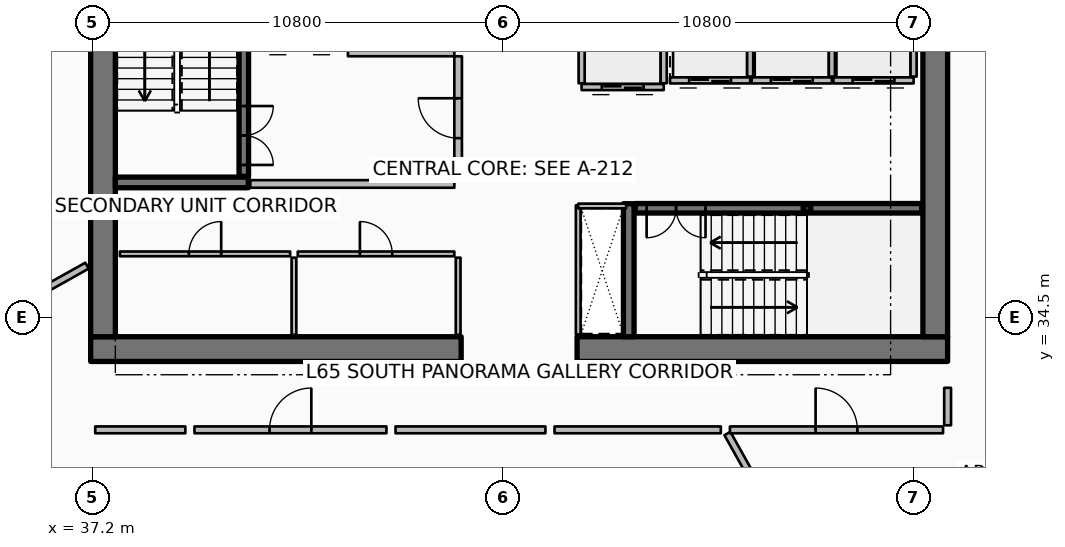
"""IFC4 building model, lengths in metres.
Left out: names, types, materials, properties, quantities, classifications, styles, units other than length and angle.
Written with IfcOpenShell. Run it as: python <this file> out.ifc"""

import sys

from ifc_helpers import new_model, si_unit, direction, frame, frame_2d, origin, origin_2d, place, context, subcontext, project, spatial, rectangle, hollow_rectangle, extrude, element, fill, save


model = new_model("IFC4")
c1 = context("Model", 3, precision=1e-05, world=origin(), true_north=direction((0.0, 1.0)))
c2 = subcontext(c1, "Body", "Model", "MODEL_VIEW")
j1 = project(units=[si_unit("LENGTHUNIT", "METRE"), si_unit("PLANEANGLEUNIT", "RADIAN")], contexts=[c1])
p1 = place(None, origin())
s1 = spatial("IfcSite", under=j1, at=p1, CompositionType="ELEMENT")
p2 = place(p1, origin())
s2 = spatial("IfcBuilding", under=s1, at=p2, CompositionType="ELEMENT")
p3 = place(p2, frame((0.0, 0.0, 259.8)))
s3 = spatial("IfcBuildingStorey", under=s2, at=p3, CompositionType="ELEMENT", Elevation=259.8)
for number, where, z_axis, x_axis in (
    (1, (37.15, 33.675, 0.0), (0.0, 0.0, 1.0), (1.0, 0.0, 0.0)),
    (2, (49.95, 33.675, 0.0), (0.0, 0.0, 1.0), (1.0, 0.0, 0.0)),
):
    element("IfcWall", number, at=place(p3, frame(where, z_axis=z_axis, x_axis=x_axis)), inside=s3, PredefinedType="SHEAR", context=c2, shape_type="SweptSolid", body=[
        extrude(rectangle(XDim=9.75, YDim=0.65, at=frame_2d((4.875, 0.0))), origin(), (0.0, 0.0, 1.0), 3.85),
    ])
for number, where, z_axis, x_axis in (
    (3, (37.475, 34.0, 0.0), (0.0, 0.0, 1.0), (0.0, 1.0, 0.0)),
    (4, (59.375, 34.0, 0.0), (0.0, 0.0, 1.0), (0.0, 1.0, 0.0)),
):
    element("IfcWall", number, at=place(p3, frame(where, z_axis=z_axis, x_axis=x_axis)), inside=s3, PredefinedType="SHEAR", context=c2, shape_type="SweptSolid", body=[
        extrude(rectangle(XDim=16.0, YDim=0.65, at=frame_2d((8.0, 0.0))), origin(), (0.0, 0.0, 1.0), 3.85),
    ])
for number, where, z_axis, x_axis in (
    (5, (37.8, 38.06, 0.0), (0.0, 0.0, 1.0), (1.0, 0.0, 0.0)),
    (6, (51.31, 34.0, 0.0), (0.0, 0.0, 1.0), (0.0, 1.0, 0.0)),
):
    element("IfcWall", number, at=place(p3, frame(where, z_axis=z_axis, x_axis=x_axis)), inside=s3, PredefinedType="SHEAR", context=c2, shape_type="SweptSolid", body=[
        extrude(rectangle(XDim=3.5, YDim=0.28, at=frame_2d((1.75, 0.0))), origin(), (0.0, 0.0, 1.0), 3.85),
    ])
p4 = place(p3, frame((56.0, 37.38, 0.0), z_axis=(0.0, 0.0, 1.0), x_axis=(1.0, 0.0, 0.0)))
e7 = element("IfcColumn", 7, at=p4, inside=s3, PredefinedType="COLUMN", context=c2, shape_type="SweptSolid", body=[
    extrude(hollow_rectangle(XDim=0.2, YDim=0.2, WallThickness=0.01, InnerFilletRadius=0.01, OuterFilletRadius=0.02, at=origin_2d()), origin(), (0.0, 0.0, 1.0), 1.72),
])
p5 = place(p3, frame((41.18, 38.22, 0.0), z_axis=(0.0, 0.0, 1.0), x_axis=(0.0, 1.0, 0.0)))
e8 = element("IfcWall", 8, at=p5, inside=s3, PredefinedType="SOLIDWALL", context=c2, shape_type="SweptSolid", body=[
    extrude(rectangle(XDim=7.56, YDim=0.25, at=frame_2d((3.78, 0.0))), origin(), (0.0, 0.0, 1.0), 3.59),
])
p6 = place(p5, frame((0.3, 0.0, 0.0)))
e9 = element("IfcOpeningElement", 9, at=p6, cuts=e8, PredefinedType="OPENING", context=c2, shape_type="SweptSolid", body=[
    extrude(rectangle(XDim=1.55, YDim=2.15, at=frame_2d((0.775, 1.075))), frame((0.0, 0.135, 0.0), z_axis=(0.0, -1.0, 0.0), x_axis=(1.0, 0.0, 0.0)), (0.0, 0.0, 1.0), 0.27),
])
p7 = place(p3, frame((51.48, 37.38, 0.0), z_axis=(0.0, 0.0, 1.0), x_axis=(1.0, 0.0, 0.0)))
e10 = element("IfcWall", 10, at=p7, inside=s3, PredefinedType="SOLIDWALL", context=c2, shape_type="SweptSolid", body=[
    extrude(rectangle(XDim=7.54, YDim=0.25, at=frame_2d((3.77, 0.0))), origin(), (0.0, 0.0, 1.0), 3.59),
])
p8 = place(p7, frame((0.3, 0.0, 0.0)))
e11 = element("IfcOpeningElement", 11, at=p8, cuts=e10, PredefinedType="OPENING", context=c2, shape_type="SweptSolid", body=[
    extrude(rectangle(XDim=1.55, YDim=2.15, at=frame_2d((0.775, 1.075))), frame((0.0, 0.135, 0.0), z_axis=(0.0, -1.0, 0.0), x_axis=(1.0, 0.0, 0.0)), (0.0, 0.0, 1.0), 0.27),
])
p9 = place(p3, frame((54.505, 40.745, 0.0), z_axis=(0.0, 0.0, 1.0), x_axis=(-1.0, 0.0, 0.0)))
e12 = element("IfcWall", 12, at=p9, inside=s3, PredefinedType="PARTITIONING", context=c2, shape_type="SweptSolid", body=[
    extrude(rectangle(XDim=2.11, YDim=0.16, at=frame_2d((1.055, 0.0))), origin(), (0.0, 0.0, 1.0), 3.59),
])
p10 = place(p9, frame((0.505, 0.0, 0.0)))
e13 = element("IfcOpeningElement", 13, at=p10, cuts=e12, PredefinedType="OPENING", context=c2, shape_type="SweptSolid", body=[
    extrude(rectangle(XDim=1.1, YDim=2.1, at=frame_2d((0.55, 1.05))), frame((0.0, 0.09, 0.0), z_axis=(0.0, -1.0, 0.0), x_axis=(1.0, 0.0, 0.0)), (0.0, 0.0, 1.0), 0.18),
])
p11 = place(p3, frame((54.505, 40.845, 0.0), z_axis=(0.0, 0.0, 1.0), x_axis=(0.0, 1.0, 0.0)))
e14 = element("IfcWall", 14, at=p11, inside=s3, PredefinedType="PARTITIONING", context=c2, shape_type="SweptSolid", body=[
    extrude(rectangle(XDim=1.61, YDim=0.16, at=frame_2d((0.805, 0.0))), origin(), (0.0, 0.0, 1.0), 3.59),
])
p12 = place(p3, frame((56.655, 40.745, 0.0), z_axis=(0.0, 0.0, 1.0), x_axis=(-1.0, 0.0, 0.0)))
e15 = element("IfcWall", 15, at=p12, inside=s3, PredefinedType="PARTITIONING", context=c2, shape_type="SweptSolid", body=[
    extrude(rectangle(XDim=2.11, YDim=0.16, at=frame_2d((1.055, 0.0))), origin(), (0.0, 0.0, 1.0), 3.59),
])
p13 = place(p12, frame((0.505, 0.0, 0.0)))
e16 = element("IfcOpeningElement", 16, at=p13, cuts=e15, PredefinedType="OPENING", context=c2, shape_type="SweptSolid", body=[
    extrude(rectangle(XDim=1.1, YDim=2.1, at=frame_2d((0.55, 1.05))), frame((0.0, 0.09, 0.0), z_axis=(0.0, -1.0, 0.0), x_axis=(1.0, 0.0, 0.0)), (0.0, 0.0, 1.0), 0.18),
])
p14 = place(p3, frame((56.655, 40.845, 0.0), z_axis=(0.0, 0.0, 1.0), x_axis=(0.0, 1.0, 0.0)))
e17 = element("IfcWall", 17, at=p14, inside=s3, PredefinedType="PARTITIONING", context=c2, shape_type="SweptSolid", body=[
    extrude(rectangle(XDim=1.61, YDim=0.16, at=frame_2d((0.805, 0.0))), origin(), (0.0, 0.0, 1.0), 3.59),
])
p15 = place(p3, frame((58.805, 40.745, 0.0), z_axis=(0.0, 0.0, 1.0), x_axis=(-1.0, 0.0, 0.0)))
e18 = element("IfcWall", 18, at=p15, inside=s3, PredefinedType="PARTITIONING", context=c2, shape_type="SweptSolid", body=[
    extrude(rectangle(XDim=2.11, YDim=0.16, at=frame_2d((1.055, 0.0))), origin(), (0.0, 0.0, 1.0), 3.59),
])
p16 = place(p15, frame((0.505, 0.0, 0.0)))
e19 = element("IfcOpeningElement", 19, at=p16, cuts=e18, PredefinedType="OPENING", context=c2, shape_type="SweptSolid", body=[
    extrude(rectangle(XDim=1.1, YDim=2.1, at=frame_2d((0.55, 1.05))), frame((0.0, 0.09, 0.0), z_axis=(0.0, -1.0, 0.0), x_axis=(1.0, 0.0, 0.0)), (0.0, 0.0, 1.0), 0.18),
])
p17 = place(p3, frame((58.805, 40.845, 0.0), z_axis=(0.0, 0.0, 1.0), x_axis=(0.0, 1.0, 0.0)))
e20 = element("IfcWall", 20, at=p17, inside=s3, PredefinedType="PARTITIONING", context=c2, shape_type="SweptSolid", body=[
    extrude(rectangle(XDim=1.61, YDim=0.16, at=frame_2d((0.805, 0.0))), origin(), (0.0, 0.0, 1.0), 3.59),
])
p18 = place(p3, frame((52.23, 40.57, 0.0), z_axis=(0.0, 0.0, 1.0), x_axis=(-1.0, 0.0, 0.0)))
e21 = element("IfcWall", 21, at=p18, inside=s3, PredefinedType="PARTITIONING", context=c2, shape_type="SweptSolid", body=[
    extrude(rectangle(XDim=2.16, YDim=0.16, at=frame_2d((1.08, 0.0))), origin(), (0.0, 0.0, 1.0), 3.59),
])
p19 = place(p18, frame((0.53, 0.0, 0.0)))
e22 = element("IfcOpeningElement", 22, at=p19, cuts=e21, PredefinedType="OPENING", context=c2, shape_type="SweptSolid", body=[
    extrude(rectangle(XDim=1.1, YDim=2.1, at=frame_2d((0.55, 1.05))), frame((0.0, 0.09, 0.0), z_axis=(0.0, -1.0, 0.0), x_axis=(1.0, 0.0, 0.0)), (0.0, 0.0, 1.0), 0.18),
])
for number, where, z_axis, x_axis in (
    (23, (52.23, 40.67, 0.0), (0.0, 0.0, 1.0), (0.0, 1.0, 0.0)),
    (24, (50.07, 40.67, 0.0), (0.0, 0.0, 1.0), (0.0, 1.0, 0.0)),
):
    element("IfcWall", number, at=place(p3, frame(where, z_axis=z_axis, x_axis=x_axis)), inside=s3, PredefinedType="PARTITIONING", context=c2, shape_type="SweptSolid", body=[
        extrude(rectangle(XDim=2.16, YDim=0.16, at=frame_2d((1.08, 0.0))), origin(), (0.0, 0.0, 1.0), 3.59),
    ])
for number, where, z_axis, x_axis in (
    (25, (46.82, 34.05, 0.0), (0.0, 0.0, 1.0), (0.0, 1.0, 0.0)),
    (26, (42.5, 34.05, 0.0), (0.0, 0.0, 1.0), (0.0, 1.0, 0.0)),
):
    element("IfcWall", number, at=place(p3, frame(where, z_axis=z_axis, x_axis=x_axis)), inside=s3, PredefinedType="PARTITIONING", context=c2, shape_type="SweptSolid", body=[
        extrude(rectangle(XDim=2.03, YDim=0.125, at=frame_2d((1.015, 0.0))), origin(), (0.0, 0.0, 1.0), 3.03),
    ])
p20 = place(p3, frame((37.92, 36.18, 0.0), z_axis=(0.0, 0.0, 1.0), x_axis=(1.0, 0.0, 0.0)))
e27 = element("IfcWall", 27, at=p20, inside=s3, PredefinedType="PARTITIONING", context=c2, shape_type="SweptSolid", body=[
    extrude(rectangle(XDim=4.48, YDim=0.125, at=frame_2d((2.24, 0.0))), origin(), (0.0, 0.0, 1.0), 3.03),
])
p21 = place(p20, frame((1.815, 0.0, 0.0)))
e28 = element("IfcOpeningElement", 28, at=p21, cuts=e27, PredefinedType="OPENING", context=c2, shape_type="SweptSolid", body=[
    extrude(rectangle(XDim=0.85, YDim=2.06, at=frame_2d((0.425, 1.03))), frame((0.0, 0.073, 0.0), z_axis=(0.0, -1.0, 0.0), x_axis=(1.0, 0.0, 0.0)), (0.0, 0.0, 1.0), 0.145),
])
p22 = place(p3, frame((42.6, 36.18, 0.0), z_axis=(0.0, 0.0, 1.0), x_axis=(1.0, 0.0, 0.0)))
e29 = element("IfcWall", 29, at=p22, inside=s3, PredefinedType="PARTITIONING", context=c2, shape_type="SweptSolid", body=[
    extrude(rectangle(XDim=4.12, YDim=0.125, at=frame_2d((2.06, 0.0))), origin(), (0.0, 0.0, 1.0), 3.03),
])
p23 = place(p22, frame((1.635, 0.0, 0.0)))
e30 = element("IfcOpeningElement", 30, at=p23, cuts=e29, PredefinedType="OPENING", context=c2, shape_type="SweptSolid", body=[
    extrude(rectangle(XDim=0.85, YDim=2.06, at=frame_2d((0.425, 1.03))), frame((0.0, 0.073, 0.0), z_axis=(0.0, -1.0, 0.0), x_axis=(1.0, 0.0, 0.0)), (0.0, 0.0, 1.0), 0.145),
])
p24 = place(p3, frame((41.35, 38.02, 0.0), z_axis=(0.0, 0.0, 1.0), x_axis=(1.0, 0.0, 0.0)))
e31 = element("IfcWall", 31, at=p24, inside=s3, PredefinedType="PARTITIONING", context=c2, shape_type="SweptSolid", body=[
    extrude(rectangle(XDim=5.37, YDim=0.2, at=frame_2d((2.685, 0.0))), origin(), (0.0, 0.0, 1.0), 3.59),
])
p25 = place(p3, frame((43.92, 41.48, 0.0), z_axis=(0.0, 0.0, 1.0), x_axis=(1.0, 0.0, 0.0)))
e32 = element("IfcWall", 32, at=p25, inside=s3, PredefinedType="PARTITIONING", context=c2, shape_type="SweptSolid", body=[
    extrude(rectangle(XDim=2.8, YDim=0.2, at=frame_2d((1.4, 0.0))), origin(), (0.0, 0.0, 1.0), 3.59),
])
p26 = place(p3, frame((46.82, 38.12, 0.0), z_axis=(0.0, 0.0, 1.0), x_axis=(0.0, 1.0, 0.0)))
e33 = element("IfcWall", 33, at=p26, inside=s3, PredefinedType="PARTITIONING", context=c2, shape_type="SweptSolid", body=[
    extrude(rectangle(XDim=3.26, YDim=0.2, at=frame_2d((1.63, 0.0))), origin(), (0.0, 0.0, 1.0), 3.59),
])
p27 = place(p26, frame((1.105, 0.0, 0.0)))
e34 = element("IfcOpeningElement", 34, at=p27, cuts=e33, PredefinedType="OPENING", context=c2, shape_type="SweptSolid", body=[
    extrude(rectangle(XDim=1.05, YDim=2.1, at=frame_2d((0.525, 1.05))), frame((0.0, 0.11, 0.0), z_axis=(0.0, -1.0, 0.0), x_axis=(1.0, 0.0, 0.0)), (0.0, 0.0, 1.0), 0.22),
])
p28 = place(p3, frame((49.98, 34.06, 0.0), z_axis=(0.0, 0.0, 1.0), x_axis=(0.0, 1.0, 0.0)))
e35 = element("IfcWall", 35, at=p28, inside=s3, PredefinedType="PARTITIONING", context=c2, shape_type="SweptSolid", body=[
    extrude(rectangle(XDim=3.4, YDim=0.125, at=frame_2d((1.7, 0.0))), origin(), (0.0, 0.0, 1.0), 3.03),
])
p29 = place(p3, frame((49.98, 37.44, 0.0), z_axis=(0.0, 0.0, 1.0), x_axis=(1.0, 0.0, 0.0)))
e36 = element("IfcWall", 36, at=p29, inside=s3, PredefinedType="PARTITIONING", context=c2, shape_type="SweptSolid", body=[
    extrude(rectangle(XDim=1.26, YDim=0.125, at=frame_2d((0.63, 0.0))), origin(), (0.0, 0.0, 1.0), 3.03),
])
p30 = place(p3, frame((37.054, 35.87, 0.0), z_axis=(0.0, 0.0, 1.0), x_axis=(-0.872490186067, -0.488631635506, 0.0)))
e37 = element("IfcWall", 37, at=p30, inside=s3, PredefinedType="PARTITIONING", context=c2, shape_type="SweptSolid", body=[
    extrude(rectangle(XDim=17.884, YDim=0.18, at=frame_2d((8.942, 0.0))), origin(), (0.0, 0.0, 1.0), 2.957),
])
p31 = place(p3, frame((53.906, 31.454, 0.0), z_axis=(0.0, 0.0, 1.0), x_axis=(0.48862654941, -0.872493034477, 0.0)))
e38 = element("IfcWall", 38, at=p31, inside=s3, PredefinedType="PARTITIONING", context=c2, shape_type="SweptSolid", body=[
    extrude(rectangle(XDim=12.508, YDim=0.18, at=frame_2d((6.254, 0.0))), origin(), (0.0, 0.0, 1.0), 2.957),
])
p32 = place(p3, frame((39.882, 31.55, 0.0), z_axis=(0.0, 0.0, 1.0), x_axis=(1.0, 0.0, 0.0)))
e39 = element("IfcWall", 39, at=p32, inside=s3, PredefinedType="PARTITIONING", context=c2, shape_type="SweptSolid", body=[
    extrude(rectangle(XDim=5.051, YDim=0.18, at=frame_2d((2.525, 0.0))), origin(), (0.0, 0.0, 1.0), 2.957),
])
p33 = place(p32, frame((1.975, 0.0, 0.0)))
e40 = element("IfcOpeningElement", 40, at=p33, cuts=e39, PredefinedType="OPENING", context=c2, shape_type="SweptSolid", body=[
    extrude(rectangle(XDim=1.1, YDim=2.1, at=frame_2d((0.55, 1.05))), frame((0.0, 0.1, 0.0), z_axis=(0.0, -1.0, 0.0), x_axis=(1.0, 0.0, 0.0)), (0.0, 0.0, 1.0), 0.2),
])
p34 = place(p3, frame((37.27, 31.55, 0.0), z_axis=(0.0, 0.0, 1.0), x_axis=(1.0, 0.0, 0.0)))
e41 = element("IfcWall", 41, at=p34, inside=s3, PredefinedType="PARTITIONING", context=c2, shape_type="SweptSolid", body=[
    extrude(rectangle(XDim=2.372, YDim=0.18, at=frame_2d((1.186, 0.0))), origin(), (0.0, 0.0, 1.0), 2.957),
])
p35 = place(p3, frame((45.173, 31.55, 0.0), z_axis=(0.0, 0.0, 1.0), x_axis=(1.0, 0.0, 0.0)))
e42 = element("IfcWall", 42, at=p35, inside=s3, PredefinedType="PARTITIONING", context=c2, shape_type="SweptSolid", body=[
    extrude(rectangle(XDim=3.944, YDim=0.18, at=frame_2d((1.972, 0.0))), origin(), (0.0, 0.0, 1.0), 2.957),
])
p36 = place(p3, frame((49.357, 31.55, 0.0), z_axis=(0.0, 0.0, 1.0), x_axis=(1.0, 0.0, 0.0)))
e43 = element("IfcWall", 43, at=p36, inside=s3, PredefinedType="PARTITIONING", context=c2, shape_type="SweptSolid", body=[
    extrude(rectangle(XDim=4.376, YDim=0.18, at=frame_2d((2.188, 0.0))), origin(), (0.0, 0.0, 1.0), 2.957),
])
p37 = place(p3, frame((53.972, 31.55, 0.0), z_axis=(0.0, 0.0, 1.0), x_axis=(1.0, 0.0, 0.0)))
e44 = element("IfcWall", 44, at=p37, inside=s3, PredefinedType="PARTITIONING", context=c2, shape_type="SweptSolid", body=[
    extrude(rectangle(XDim=5.608, YDim=0.18, at=frame_2d((2.804, 0.0))), origin(), (0.0, 0.0, 1.0), 2.957),
])
p38 = place(p37, frame((2.254, 0.0, 0.0)))
e45 = element("IfcOpeningElement", 45, at=p38, cuts=e44, PredefinedType="OPENING", context=c2, shape_type="SweptSolid", body=[
    extrude(rectangle(XDim=1.1, YDim=2.1, at=frame_2d((0.55, 1.05))), frame((0.0, 0.1, 0.0), z_axis=(0.0, -1.0, 0.0), x_axis=(1.0, 0.0, 0.0)), (0.0, 0.0, 1.0), 0.2),
])
p39 = place(p3, frame((59.7, 31.67, 0.0), z_axis=(0.0, 0.0, 1.0), x_axis=(0.0, 1.0, 0.0)))
e46 = element("IfcWall", 46, at=p39, inside=s3, PredefinedType="PARTITIONING", context=c2, shape_type="SweptSolid", body=[
    extrude(rectangle(XDim=0.987, YDim=0.18, at=frame_2d((0.493, 0.0))), origin(), (0.0, 0.0, 1.0), 2.957),
])
p40 = place(p6, origin())
e47 = element("IfcDoor", 47, at=p40, inside=s3, OperationType="DOUBLE_DOOR_SINGLE_SWING", PredefinedType="DOOR", context=c2, shape_type="SweptSolid", body=[
    extrude(rectangle(XDim=1.55, YDim=2.15, at=frame_2d((0.775, 1.075))), frame((0.0, 0.025, 0.0), z_axis=(0.0, -1.0, 0.0), x_axis=(1.0, 0.0, 0.0)), (0.0, 0.0, 1.0), 0.05),
])
fill(e9, e47)
p41 = place(p8, origin())
e48 = element("IfcDoor", 48, at=p41, inside=s3, OperationType="DOUBLE_DOOR_SINGLE_SWING", PredefinedType="DOOR", context=c2, shape_type="SweptSolid", body=[
    extrude(rectangle(XDim=1.55, YDim=2.15, at=frame_2d((0.775, 1.075))), frame((0.0, 0.025, 0.0), z_axis=(0.0, -1.0, 0.0), x_axis=(1.0, 0.0, 0.0)), (0.0, 0.0, 1.0), 0.05),
])
fill(e11, e48)
p42 = place(p10, origin())
e49 = element("IfcDoor", 49, at=p42, inside=s3, OperationType="DOUBLE_DOOR_SLIDING", PredefinedType="DOOR", context=c2, shape_type="SweptSolid", body=[
    extrude(rectangle(XDim=1.1, YDim=2.1, at=frame_2d((0.55, 1.05))), frame((0.0, 0.025, 0.0), z_axis=(0.0, -1.0, 0.0), x_axis=(1.0, 0.0, 0.0)), (0.0, 0.0, 1.0), 0.05),
])
fill(e13, e49)
p43 = place(p13, origin())
e50 = element("IfcDoor", 50, at=p43, inside=s3, OperationType="DOUBLE_DOOR_SLIDING", PredefinedType="DOOR", context=c2, shape_type="SweptSolid", body=[
    extrude(rectangle(XDim=1.1, YDim=2.1, at=frame_2d((0.55, 1.05))), frame((0.0, 0.025, 0.0), z_axis=(0.0, -1.0, 0.0), x_axis=(1.0, 0.0, 0.0)), (0.0, 0.0, 1.0), 0.05),
])
fill(e16, e50)
p44 = place(p16, origin())
e51 = element("IfcDoor", 51, at=p44, inside=s3, OperationType="DOUBLE_DOOR_SLIDING", PredefinedType="DOOR", context=c2, shape_type="SweptSolid", body=[
    extrude(rectangle(XDim=1.1, YDim=2.1, at=frame_2d((0.55, 1.05))), frame((0.0, 0.025, 0.0), z_axis=(0.0, -1.0, 0.0), x_axis=(1.0, 0.0, 0.0)), (0.0, 0.0, 1.0), 0.05),
])
fill(e19, e51)
p45 = place(p19, origin())
e52 = element("IfcDoor", 52, at=p45, inside=s3, OperationType="DOUBLE_DOOR_SLIDING", PredefinedType="DOOR", context=c2, shape_type="SweptSolid", body=[
    extrude(rectangle(XDim=1.1, YDim=2.1, at=frame_2d((0.55, 1.05))), frame((0.0, 0.025, 0.0), z_axis=(0.0, -1.0, 0.0), x_axis=(1.0, 0.0, 0.0)), (0.0, 0.0, 1.0), 0.05),
])
fill(e22, e52)
p46 = place(p21, origin())
e53 = element("IfcDoor", 53, at=p46, inside=s3, OperationType="SINGLE_SWING_RIGHT", PredefinedType="DOOR", context=c2, shape_type="SweptSolid", body=[
    extrude(rectangle(XDim=0.85, YDim=2.06, at=frame_2d((0.425, 1.03))), frame((0.0, 0.025, 0.0), z_axis=(0.0, -1.0, 0.0), x_axis=(1.0, 0.0, 0.0)), (0.0, 0.0, 1.0), 0.05),
])
fill(e28, e53)
p47 = place(p23, origin())
e54 = element("IfcDoor", 54, at=p47, inside=s3, OperationType="SINGLE_SWING_LEFT", PredefinedType="DOOR", context=c2, shape_type="SweptSolid", body=[
    extrude(rectangle(XDim=0.85, YDim=2.06, at=frame_2d((0.425, 1.03))), frame((0.0, 0.025, 0.0), z_axis=(0.0, -1.0, 0.0), x_axis=(1.0, 0.0, 0.0)), (0.0, 0.0, 1.0), 0.05),
])
fill(e30, e54)
p48 = place(p27, origin())
e55 = element("IfcDoor", 55, at=p48, inside=s3, OperationType="SINGLE_SWING_RIGHT", PredefinedType="DOOR", context=c2, shape_type="SweptSolid", body=[
    extrude(rectangle(XDim=1.05, YDim=2.1, at=frame_2d((0.525, 1.05))), frame((0.0, 0.025, 0.0), z_axis=(0.0, -1.0, 0.0), x_axis=(1.0, 0.0, 0.0)), (0.0, 0.0, 1.0), 0.05),
])
fill(e34, e55)
p49 = place(p33, origin())
e56 = element("IfcDoor", 56, at=p49, inside=s3, OperationType="SINGLE_SWING_RIGHT", PredefinedType="DOOR", context=c2, shape_type="SweptSolid", body=[
    extrude(rectangle(XDim=1.1, YDim=2.1, at=frame_2d((0.55, 1.05))), frame((0.0, 0.025, 0.0), z_axis=(0.0, -1.0, 0.0), x_axis=(1.0, 0.0, 0.0)), (0.0, 0.0, 1.0), 0.05),
])
fill(e40, e56)
p50 = place(p38, origin())
e57 = element("IfcDoor", 57, at=p50, inside=s3, OperationType="SINGLE_SWING_LEFT", PredefinedType="DOOR", context=c2, shape_type="SweptSolid", body=[
    extrude(rectangle(XDim=1.1, YDim=2.1, at=frame_2d((0.55, 1.05))), frame((0.0, 0.025, 0.0), z_axis=(0.0, -1.0, 0.0), x_axis=(1.0, 0.0, 0.0)), (0.0, 0.0, 1.0), 0.05),
])
fill(e45, e57)
save(model, sys.argv[1])
